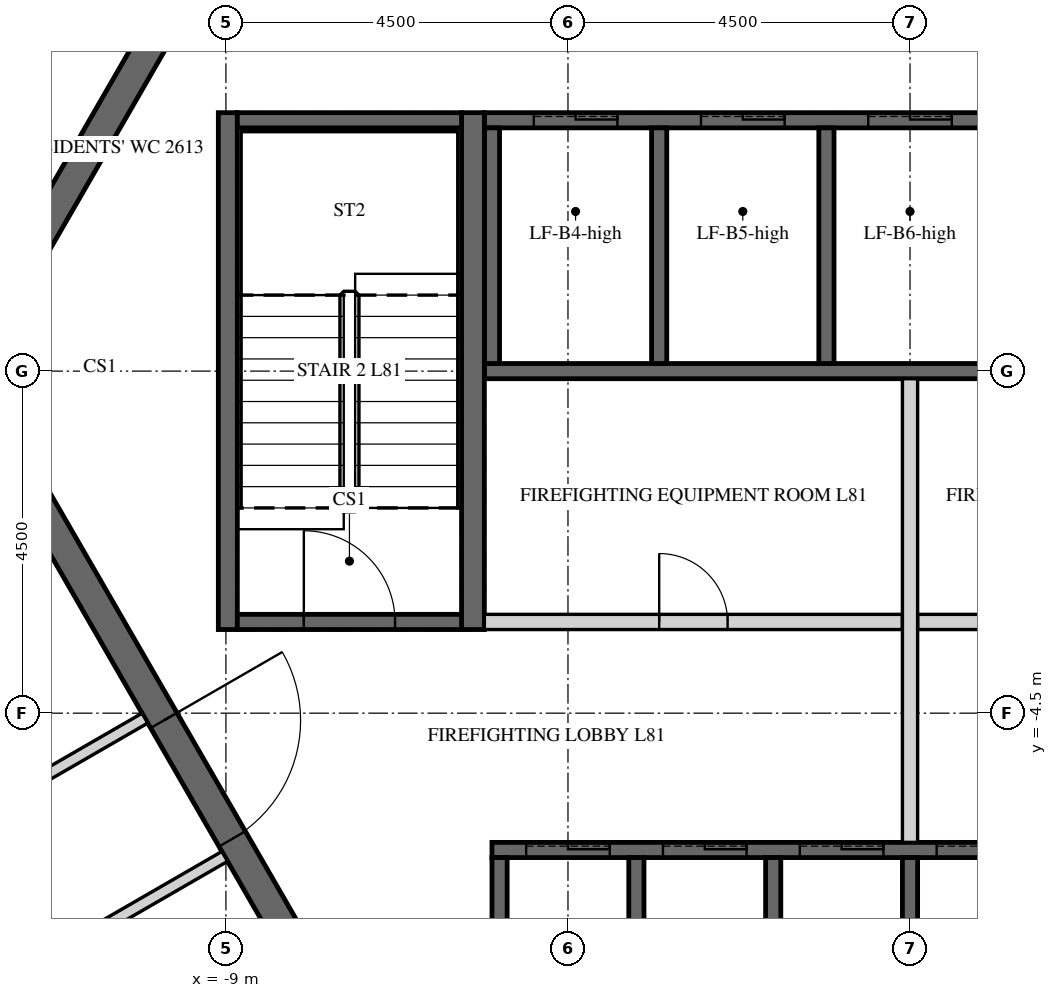
"""IFC4 building model, lengths in metres.
Left out: names, types, materials, properties, quantities, classifications, styles, units other than length and angle.
Written with IfcOpenShell. Run it as: python <this file> out.ifc"""

import sys

from ifc_helpers import new_model, si_unit, direction, frame, frame_2d, origin, place, context, subcontext, project, spatial, polyline, rectangle, outline, extrude, element, fill, save


model = new_model("IFC4")
c1 = context("Model", 3, precision=1e-05, world=origin(), true_north=direction((0.0, 1.0)))
c2 = subcontext(c1, "Body", "Model", "MODEL_VIEW")
j1 = project(units=[si_unit("LENGTHUNIT", "METRE"), si_unit("PLANEANGLEUNIT", "RADIAN")], contexts=[c1])
p1 = place(None, origin())
s1 = spatial("IfcSite", under=j1, at=p1, CompositionType="ELEMENT")
p2 = place(p1, origin())
s2 = spatial("IfcBuilding", under=s1, at=p2, CompositionType="ELEMENT")
p3 = place(p2, frame((0.0, 0.0, 334.2)))
s3 = spatial("IfcBuildingStorey", under=s2, at=p3, CompositionType="ELEMENT", Elevation=334.2)
p4 = place(p3, frame((-6.235, 10.8, -0.15), z_axis=(0.0, 0.0, 1.0), x_axis=(-0.499996419489, -0.866027470984, 0.0)))
e1 = element("IfcWall", 1, at=p4, inside=s3, PredefinedType="SHEAR", context=c2, shape_type="SweptSolid", body=[
    extrude(outline(polyline([(-0.115, -0.2), (12.586, -0.2), (12.355, 0.2), (0.115, 0.2), (-0.115, -0.2)])), origin(), (0.0, 0.0, 1.0), 3.75),
])
p5 = place(p4, frame((5.364, 0.0, 0.15)))
e2 = element("IfcOpeningElement", 2, at=p5, cuts=e1, PredefinedType="OPENING", context=c2, shape_type="SweptSolid", body=[
    extrude(rectangle(XDim=1.8, YDim=2.4, at=frame_2d((0.9, 1.2))), frame((0.0, 0.21, 0.0), z_axis=(0.0, -1.0, 0.0), x_axis=(1.0, 0.0, 0.0)), (0.0, 0.0, 1.0), 0.42),
])
p6 = place(p3, frame((-12.471, 0.0, -0.15), z_axis=(0.0, 0.0, 1.0), x_axis=(0.499996419489, -0.866027470984, 0.0)))
e3 = element("IfcWall", 3, at=p6, inside=s3, PredefinedType="SHEAR", context=c2, shape_type="SweptSolid", body=[
    extrude(outline(polyline([(-0.115, -0.2), (12.586, -0.2), (12.355, 0.2), (0.115, 0.2), (-0.115, -0.2)])), origin(), (0.0, 0.0, 1.0), 3.75),
])
p7 = place(p6, frame((5.306, 0.0, 0.15)))
e4 = element("IfcOpeningElement", 4, at=p7, cuts=e3, PredefinedType="OPENING", context=c2, shape_type="SweptSolid", body=[
    extrude(rectangle(XDim=1.8, YDim=2.4, at=frame_2d((0.9, 1.2))), frame((0.0, 0.21, 0.0), z_axis=(0.0, -1.0, 0.0), x_axis=(1.0, 0.0, 0.0)), (0.0, 0.0, 1.0), 0.42),
])
p8 = place(p3, frame((-5.6, 3.3, -0.25), z_axis=(0.0, 0.0, 1.0), x_axis=(1.0, 0.0, 0.0)))
e5 = element("IfcWall", 5, at=p8, inside=s3, PredefinedType="SHEAR", context=c2, shape_type="SweptSolid", body=[
    extrude(rectangle(XDim=6.6, YDim=0.2, at=frame_2d((3.3, 0.0))), origin(), (0.0, 0.0, 1.0), 3.9),
])
p9 = place(p8, frame((0.65, 0.0, 0.25)))
e6 = element("IfcOpeningElement", 6, at=p9, cuts=e5, PredefinedType="OPENING", context=c2, shape_type="SweptSolid", body=[
    extrude(rectangle(XDim=1.1, YDim=2.1, at=frame_2d((0.55, 1.05))), frame((0.0, 0.11, 0.0), z_axis=(0.0, -1.0, 0.0), x_axis=(1.0, 0.0, 0.0)), (0.0, 0.0, 1.0), 0.22),
])
p10 = place(p8, frame((2.85, 0.0, 0.25)))
e7 = element("IfcOpeningElement", 7, at=p10, cuts=e5, PredefinedType="OPENING", context=c2, shape_type="SweptSolid", body=[
    extrude(rectangle(XDim=1.1, YDim=2.1, at=frame_2d((0.55, 1.05))), frame((0.0, 0.11, 0.0), z_axis=(0.0, -1.0, 0.0), x_axis=(1.0, 0.0, 0.0)), (0.0, 0.0, 1.0), 0.22),
])
p11 = place(p8, frame((5.05, 0.0, 0.25)))
e8 = element("IfcOpeningElement", 8, at=p11, cuts=e5, PredefinedType="OPENING", context=c2, shape_type="SweptSolid", body=[
    extrude(rectangle(XDim=1.1, YDim=2.1, at=frame_2d((0.55, 1.05))), frame((0.0, 0.11, 0.0), z_axis=(0.0, -1.0, 0.0), x_axis=(1.0, 0.0, 0.0)), (0.0, 0.0, 1.0), 0.22),
])
p12 = place(p3, frame((-5.6, 0.0, -0.25), z_axis=(0.0, 0.0, 1.0), x_axis=(1.0, 0.0, 0.0)))
e9 = element("IfcWall", 9, at=p12, inside=s3, PredefinedType="SHEAR", context=c2, shape_type="SweptSolid", body=[
    extrude(rectangle(XDim=11.2, YDim=0.2, at=frame_2d((5.6, 0.0))), origin(), (0.0, 0.0, 1.0), 3.9),
])
for number, where, z_axis, x_axis in (
    (10, (-5.5, 0.1, -0.25), (0.0, 0.0, 1.0), (0.0, 1.0, 0.0)),
    (11, (-3.3, 0.1, -0.25), (0.0, 0.0, 1.0), (0.0, 1.0, 0.0)),
    (12, (-1.1, 0.1, -0.25), (0.0, 0.0, 1.0), (0.0, 1.0, 0.0)),
):
    element("IfcWall", number, at=place(p3, frame(where, z_axis=z_axis, x_axis=x_axis)), inside=s3, PredefinedType="SHEAR", context=c2, shape_type="SweptSolid", body=[
        extrude(rectangle(XDim=3.1, YDim=0.2, at=frame_2d((1.55, 0.0))), origin(), (0.0, 0.0, 1.0), 3.9),
    ])
p13 = place(p3, frame((-5.5, -6.3, -0.25), z_axis=(0.0, 0.0, 1.0), x_axis=(1.0, 0.0, 0.0)))
e13 = element("IfcWall", 13, at=p13, inside=s3, PredefinedType="SHEAR", context=c2, shape_type="SweptSolid", body=[
    extrude(rectangle(XDim=9.2, YDim=0.2, at=frame_2d((4.6, 0.0))), origin(), (0.0, 0.0, 1.0), 3.9),
])
p14 = place(p13, frame((0.45, 0.0, 0.25)))
e14 = element("IfcOpeningElement", 14, at=p14, cuts=e13, PredefinedType="OPENING", context=c2, shape_type="SweptSolid", body=[
    extrude(rectangle(XDim=1.1, YDim=2.1, at=frame_2d((0.55, 1.05))), frame((0.0, 0.11, 0.0), z_axis=(0.0, -1.0, 0.0), x_axis=(1.0, 0.0, 0.0)), (0.0, 0.0, 1.0), 0.22),
])
p15 = place(p13, frame((2.25, 0.0, 0.25)))
e15 = element("IfcOpeningElement", 15, at=p15, cuts=e13, PredefinedType="OPENING", context=c2, shape_type="SweptSolid", body=[
    extrude(rectangle(XDim=1.1, YDim=2.1, at=frame_2d((0.55, 1.05))), frame((0.0, 0.11, 0.0), z_axis=(0.0, -1.0, 0.0), x_axis=(1.0, 0.0, 0.0)), (0.0, 0.0, 1.0), 0.22),
])
p16 = place(p13, frame((4.05, 0.0, 0.25)))
e16 = element("IfcOpeningElement", 16, at=p16, cuts=e13, PredefinedType="OPENING", context=c2, shape_type="SweptSolid", body=[
    extrude(rectangle(XDim=1.1, YDim=2.1, at=frame_2d((0.55, 1.05))), frame((0.0, 0.11, 0.0), z_axis=(0.0, -1.0, 0.0), x_axis=(1.0, 0.0, 0.0)), (0.0, 0.0, 1.0), 0.22),
])
p17 = place(p13, frame((5.85, 0.0, 0.25)))
e17 = element("IfcOpeningElement", 17, at=p17, cuts=e13, PredefinedType="OPENING", context=c2, shape_type="SweptSolid", body=[
    extrude(rectangle(XDim=1.1, YDim=2.1, at=frame_2d((0.55, 1.05))), frame((0.0, 0.11, 0.0), z_axis=(0.0, -1.0, 0.0), x_axis=(1.0, 0.0, 0.0)), (0.0, 0.0, 1.0), 0.22),
])
p18 = place(p13, frame((7.65, 0.0, 0.25)))
e18 = element("IfcOpeningElement", 18, at=p18, cuts=e13, PredefinedType="OPENING", context=c2, shape_type="SweptSolid", body=[
    extrude(rectangle(XDim=1.1, YDim=2.1, at=frame_2d((0.55, 1.05))), frame((0.0, 0.11, 0.0), z_axis=(0.0, -1.0, 0.0), x_axis=(1.0, 0.0, 0.0)), (0.0, 0.0, 1.0), 0.22),
])
for number, where, z_axis, x_axis in (
    (19, (-5.4, -9.3, -0.25), (0.0, 0.0, 1.0), (0.0, 1.0, 0.0)),
    (20, (-3.6, -9.3, -0.25), (0.0, 0.0, 1.0), (0.0, 1.0, 0.0)),
    (21, (-1.8, -9.3, -0.25), (0.0, 0.0, 1.0), (0.0, 1.0, 0.0)),
    (22, (0.0, -9.3, -0.25), (0.0, 0.0, 1.0), (0.0, 1.0, 0.0)),
):
    element("IfcWall", number, at=place(p3, frame(where, z_axis=z_axis, x_axis=x_axis)), inside=s3, PredefinedType="SHEAR", context=c2, shape_type="SweptSolid", body=[
        extrude(rectangle(XDim=2.9, YDim=0.2, at=frame_2d((1.45, 0.0))), origin(), (0.0, 0.0, 1.0), 3.9),
    ])
p19 = place(p3, frame((-5.6, -3.3, 0.0), z_axis=(0.0, 0.0, 1.0), x_axis=(1.0, 0.0, 0.0)))
e23 = element("IfcWall", 23, at=p19, inside=s3, PredefinedType="PARTITIONING", context=c2, shape_type="SweptSolid", body=[
    extrude(rectangle(XDim=5.5, YDim=0.2, at=frame_2d((2.75, 0.0))), origin(), (0.0, 0.0, 1.0), 3.65),
])
p20 = place(p19, frame((2.3, 0.0, 0.0)))
e24 = element("IfcOpeningElement", 24, at=p20, cuts=e23, PredefinedType="OPENING", context=c2, shape_type="SweptSolid", body=[
    extrude(rectangle(XDim=0.9, YDim=2.1, at=frame_2d((0.45, 1.05))), frame((0.0, 0.11, 0.0), z_axis=(0.0, -1.0, 0.0), x_axis=(1.0, 0.0, 0.0)), (0.0, 0.0, 1.0), 0.22),
])
p21 = place(p3, frame((0.1, -3.3, 0.0), z_axis=(0.0, 0.0, 1.0), x_axis=(1.0, 0.0, 0.0)))
e25 = element("IfcWall", 25, at=p21, inside=s3, PredefinedType="PARTITIONING", context=c2, shape_type="SweptSolid", body=[
    extrude(rectangle(XDim=5.5, YDim=0.2, at=frame_2d((2.75, 0.0))), origin(), (0.0, 0.0, 1.0), 3.65),
])
p22 = place(p21, frame((2.3, 0.0, 0.0)))
e26 = element("IfcOpeningElement", 26, at=p22, cuts=e25, PredefinedType="OPENING", context=c2, shape_type="SweptSolid", body=[
    extrude(rectangle(XDim=0.9, YDim=2.1, at=frame_2d((0.45, 1.05))), frame((0.0, 0.11, 0.0), z_axis=(0.0, -1.0, 0.0), x_axis=(1.0, 0.0, 0.0)), (0.0, 0.0, 1.0), 0.22),
])
p23 = place(p3, frame((0.0, -6.2, 0.0), z_axis=(0.0, 0.0, 1.0), x_axis=(0.0, 1.0, 0.0)))
e27 = element("IfcWall", 27, at=p23, inside=s3, PredefinedType="PARTITIONING", context=c2, shape_type="SweptSolid", body=[
    extrude(rectangle(XDim=6.1, YDim=0.2, at=frame_2d((3.05, 0.0))), origin(), (0.0, 0.0, 1.0), 3.65),
])
p24 = place(p3, frame((-5.75, -3.4, -0.25), z_axis=(0.0, 0.0, 1.0), x_axis=(0.0, 1.0, 0.0)))
e28 = element("IfcWall", 28, at=p24, inside=s3, PredefinedType="SHEAR", context=c2, shape_type="SweptSolid", body=[
    extrude(rectangle(XDim=6.8, YDim=0.3, at=frame_2d((3.4, 0.0))), origin(), (0.0, 0.0, 1.0), 3.9),
])
p25 = place(p3, frame((-8.975, -3.4, -0.25), z_axis=(0.0, 0.0, 1.0), x_axis=(0.0, 1.0, 0.0)))
e29 = element("IfcWall", 29, at=p25, inside=s3, PredefinedType="SHEAR", context=c2, shape_type="SweptSolid", body=[
    extrude(rectangle(XDim=6.8, YDim=0.25, at=frame_2d((3.4, 0.0))), origin(), (0.0, 0.0, 1.0), 3.9),
])
p26 = place(p3, frame((-8.85, 3.3, -0.25), z_axis=(0.0, 0.0, 1.0), x_axis=(1.0, 0.0, 0.0)))
e30 = element("IfcWall", 30, at=p26, inside=s3, PredefinedType="SHEAR", context=c2, shape_type="SweptSolid", body=[
    extrude(rectangle(XDim=2.95, YDim=0.2, at=frame_2d((1.475, 0.0))), origin(), (0.0, 0.0, 1.0), 3.9),
])
p27 = place(p3, frame((-8.85, -3.3, -0.25), z_axis=(0.0, 0.0, 1.0), x_axis=(1.0, 0.0, 0.0)))
e31 = element("IfcWall", 31, at=p27, inside=s3, PredefinedType="SHEAR", context=c2, shape_type="SweptSolid", body=[
    extrude(rectangle(XDim=2.95, YDim=0.2, at=frame_2d((1.475, 0.0))), origin(), (0.0, 0.0, 1.0), 3.9),
])
p28 = place(p27, frame((0.875, 0.0, 0.25)))
e32 = element("IfcOpeningElement", 32, at=p28, cuts=e31, PredefinedType="OPENING", context=c2, shape_type="SweptSolid", body=[
    extrude(rectangle(XDim=1.2, YDim=2.4, at=frame_2d((0.6, 1.2))), frame((0.0, 0.11, 0.0), z_axis=(0.0, -1.0, 0.0), x_axis=(1.0, 0.0, 0.0)), (0.0, 0.0, 1.0), 0.22),
])
p29 = place(p3, frame((-8.247, 16.625, 0.0), z_axis=(0.0, 0.0, 1.0), x_axis=(-0.438376416131, -0.89879147625, 0.0)))
e33 = element("IfcWall", 33, at=p29, inside=s3, PredefinedType="PARTITIONING", context=c2, shape_type="SweptSolid", body=[
    extrude(rectangle(XDim=16.606, YDim=0.15, at=frame_2d((8.303, 0.0))), origin(), (0.0, 0.0, 1.0), 2.838),
])
p30 = place(p29, frame((6.103, 0.0, 0.0)))
e34 = element("IfcOpeningElement", 34, at=p30, cuts=e33, PredefinedType="OPENING", context=c2, shape_type="SweptSolid", body=[
    extrude(rectangle(XDim=1.0, YDim=2.1, at=frame_2d((0.5, 1.05))), frame((0.0, 0.085, 0.0), z_axis=(0.0, -1.0, 0.0), x_axis=(1.0, 0.0, 0.0)), (0.0, 0.0, 1.0), 0.17),
])
p31 = place(p3, frame((-17.696, -2.749, 0.0), z_axis=(0.0, 0.0, 1.0), x_axis=(0.499997948852, -0.866026588012, 0.0)))
e35 = element("IfcWall", 35, at=p31, inside=s3, PredefinedType="PARTITIONING", context=c2, shape_type="SweptSolid", body=[
    extrude(rectangle(XDim=14.677, YDim=0.15, at=frame_2d((7.339, 0.0))), origin(), (0.0, 0.0, 1.0), 2.838),
])
p32 = place(p31, frame((0.4, 0.0, 0.0)))
e36 = element("IfcOpeningElement", 36, at=p32, cuts=e35, PredefinedType="OPENING", context=c2, shape_type="SweptSolid", body=[
    extrude(rectangle(XDim=1.0, YDim=2.1, at=frame_2d((0.5, 1.05))), frame((0.0, 0.085, 0.0), z_axis=(0.0, -1.0, 0.0), x_axis=(1.0, 0.0, 0.0)), (0.0, 0.0, 1.0), 0.17),
])
p33 = place(p31, frame((13.527, 0.0, 0.0)))
e37 = element("IfcOpeningElement", 37, at=p33, cuts=e35, PredefinedType="OPENING", context=c2, shape_type="SweptSolid", body=[
    extrude(rectangle(XDim=1.0, YDim=2.1, at=frame_2d((0.5, 1.05))), frame((0.0, 0.085, 0.0), z_axis=(0.0, -1.0, 0.0), x_axis=(1.0, 0.0, 0.0)), (0.0, 0.0, 1.0), 0.17),
])
p34 = place(p3, frame((-10.066, -4.566, 0.0), z_axis=(0.0, 0.0, 1.0), x_axis=(-0.866023935413, -0.500002543286, 0.0)))
e38 = element("IfcWall", 38, at=p34, inside=s3, PredefinedType="PARTITIONING", context=c2, shape_type="SweptSolid", body=[
    extrude(rectangle(XDim=4.2, YDim=0.15, at=frame_2d((2.1, 0.0))), origin(), (0.0, 0.0, 1.0), 2.838),
])
p35 = place(p3, frame((-12.588, -8.447, 0.0), z_axis=(0.0, 0.0, 1.0), x_axis=(0.866034795751, 0.499983732284, 0.0)))
e39 = element("IfcWall", 39, at=p35, inside=s3, PredefinedType="PARTITIONING", context=c2, shape_type="SweptSolid", body=[
    extrude(rectangle(XDim=4.125, YDim=0.15, at=frame_2d((2.062, 0.0))), origin(), (0.0, 0.0, 1.0), 2.838),
])
p36 = place(p7, origin())
e40 = element("IfcDoor", 40, at=p36, inside=s3, OperationType="DOUBLE_DOOR_SINGLE_SWING", PredefinedType="DOOR", context=c2, shape_type="SweptSolid", body=[
    extrude(rectangle(XDim=1.8, YDim=2.4, at=frame_2d((0.9, 1.2))), frame((0.0, 0.025, 0.0), z_axis=(0.0, -1.0, 0.0), x_axis=(1.0, 0.0, 0.0)), (0.0, 0.0, 1.0), 0.05),
])
fill(e4, e40)
p37 = place(p20, origin())
e41 = element("IfcDoor", 41, at=p37, inside=s3, OperationType="SINGLE_SWING_LEFT", PredefinedType="DOOR", context=c2, shape_type="SweptSolid", body=[
    extrude(rectangle(XDim=0.9, YDim=2.1, at=frame_2d((0.45, 1.05))), frame((0.0, 0.025, 0.0), z_axis=(0.0, -1.0, 0.0), x_axis=(1.0, 0.0, 0.0)), (0.0, 0.0, 1.0), 0.05),
])
fill(e24, e41)
p38 = place(p28, origin())
e42 = element("IfcDoor", 42, at=p38, inside=s3, OperationType="SINGLE_SWING_LEFT", PredefinedType="DOOR", context=c2, shape_type="SweptSolid", body=[
    extrude(rectangle(XDim=1.2, YDim=2.4, at=frame_2d((0.6, 1.2))), frame((0.0, 0.025, 0.0), z_axis=(0.0, -1.0, 0.0), x_axis=(1.0, 0.0, 0.0)), (0.0, 0.0, 1.0), 0.05),
])
fill(e32, e42)
p39 = place(p9, origin())
e43 = element("IfcDoor", 43, at=p39, inside=s3, OperationType="SLIDING_TO_LEFT", PredefinedType="DOOR", context=c2, shape_type="SweptSolid", body=[
    extrude(rectangle(XDim=1.1, YDim=2.1, at=frame_2d((0.55, 1.05))), frame((0.0, 0.025, 0.0), z_axis=(0.0, -1.0, 0.0), x_axis=(1.0, 0.0, 0.0)), (0.0, 0.0, 1.0), 0.05),
])
fill(e6, e43)
p40 = place(p10, origin())
e44 = element("IfcDoor", 44, at=p40, inside=s3, OperationType="SLIDING_TO_LEFT", PredefinedType="DOOR", context=c2, shape_type="SweptSolid", body=[
    extrude(rectangle(XDim=1.1, YDim=2.1, at=frame_2d((0.55, 1.05))), frame((0.0, 0.025, 0.0), z_axis=(0.0, -1.0, 0.0), x_axis=(1.0, 0.0, 0.0)), (0.0, 0.0, 1.0), 0.05),
])
fill(e7, e44)
p41 = place(p11, origin())
e45 = element("IfcDoor", 45, at=p41, inside=s3, OperationType="SLIDING_TO_LEFT", PredefinedType="DOOR", context=c2, shape_type="SweptSolid", body=[
    extrude(rectangle(XDim=1.1, YDim=2.1, at=frame_2d((0.55, 1.05))), frame((0.0, 0.025, 0.0), z_axis=(0.0, -1.0, 0.0), x_axis=(1.0, 0.0, 0.0)), (0.0, 0.0, 1.0), 0.05),
])
fill(e8, e45)
p42 = place(p14, origin())
e46 = element("IfcDoor", 46, at=p42, inside=s3, OperationType="SLIDING_TO_LEFT", PredefinedType="DOOR", context=c2, shape_type="SweptSolid", body=[
    extrude(rectangle(XDim=1.1, YDim=2.1, at=frame_2d((0.55, 1.05))), frame((0.0, 0.025, 0.0), z_axis=(0.0, -1.0, 0.0), x_axis=(1.0, 0.0, 0.0)), (0.0, 0.0, 1.0), 0.05),
])
fill(e14, e46)
p43 = place(p15, origin())
e47 = element("IfcDoor", 47, at=p43, inside=s3, OperationType="SLIDING_TO_LEFT", PredefinedType="DOOR", context=c2, shape_type="SweptSolid", body=[
    extrude(rectangle(XDim=1.1, YDim=2.1, at=frame_2d((0.55, 1.05))), frame((0.0, 0.025, 0.0), z_axis=(0.0, -1.0, 0.0), x_axis=(1.0, 0.0, 0.0)), (0.0, 0.0, 1.0), 0.05),
])
fill(e15, e47)
p44 = place(p16, origin())
e48 = element("IfcDoor", 48, at=p44, inside=s3, OperationType="SLIDING_TO_LEFT", PredefinedType="DOOR", context=c2, shape_type="SweptSolid", body=[
    extrude(rectangle(XDim=1.1, YDim=2.1, at=frame_2d((0.55, 1.05))), frame((0.0, 0.025, 0.0), z_axis=(0.0, -1.0, 0.0), x_axis=(1.0, 0.0, 0.0)), (0.0, 0.0, 1.0), 0.05),
])
fill(e16, e48)
p45 = place(p17, origin())
e49 = element("IfcDoor", 49, at=p45, inside=s3, OperationType="SLIDING_TO_LEFT", PredefinedType="DOOR", context=c2, shape_type="SweptSolid", body=[
    extrude(rectangle(XDim=1.1, YDim=2.1, at=frame_2d((0.55, 1.05))), frame((0.0, 0.025, 0.0), z_axis=(0.0, -1.0, 0.0), x_axis=(1.0, 0.0, 0.0)), (0.0, 0.0, 1.0), 0.05),
])
fill(e17, e49)
save(model, sys.argv[1])
